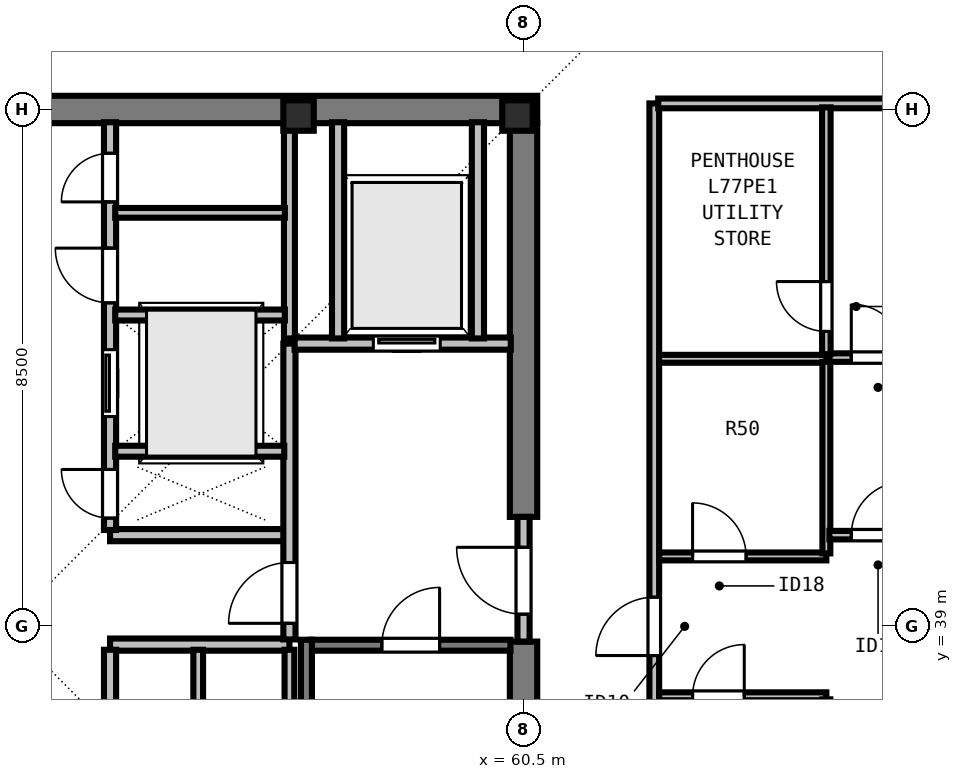
"""IFC4 building model, lengths in metres.
Left out: names, types, materials, properties, quantities, classifications, styles, units other than length and angle.
Written with IfcOpenShell. Run it as: python <this file> out.ifc"""

import sys

from ifc_helpers import new_model, si_unit, direction, frame, frame_2d, origin, origin_2d, place, context, subcontext, project, spatial, rectangle, i_section, extrude, element, fill, save


model = new_model("IFC4")
c1 = context("Model", 3, precision=1e-05, world=origin(), true_north=direction((0.0, 1.0)))
c2 = subcontext(c1, "Body", "Model", "MODEL_VIEW")
j1 = project(units=[si_unit("LENGTHUNIT", "METRE"), si_unit("PLANEANGLEUNIT", "RADIAN")], contexts=[c1])
p1 = place(None, origin())
s1 = spatial("IfcSite", under=j1, at=p1, CompositionType="ELEMENT")
p2 = place(p1, origin())
s2 = spatial("IfcBuilding", under=s1, at=p2, CompositionType="ELEMENT")
p3 = place(p2, frame((0.0, 0.0, 280.5)))
s3 = spatial("IfcBuildingStorey", under=s2, at=p3, CompositionType="ELEMENT", Elevation=280.5)
for number, where, z_axis, x_axis in (
    (1, (56.8, 47.4, 0.0), (0.0, 0.0, 1.0), (1.0, 0.0, 0.0)),
    (2, (60.4, 47.4, 0.0), (0.0, 0.0, 1.0), (1.0, 0.0, 0.0)),
):
    element("IfcColumn", number, at=place(p3, frame(where, z_axis=z_axis, x_axis=x_axis)), inside=s3, PredefinedType="COLUMN", context=c2, shape_type="SweptSolid", body=[
        extrude(i_section(OverallWidth=0.5, OverallDepth=0.5, WebThickness=0.028, FlangeThickness=0.045, at=origin_2d()), origin(), (0.0, 0.0, 1.0), 3.5),
    ])
p4 = place(p3, frame((43.275, 47.5, 0.0), z_axis=(0.0, 0.0, 1.0), x_axis=(1.0, 0.0, 0.0)))
e3 = element("IfcWall", 3, at=p4, inside=s3, PredefinedType="SHEAR", context=c2, shape_type="SweptSolid", body=[
    extrude(rectangle(XDim=17.45, YDim=0.45, at=frame_2d((8.725, 0.0))), origin(), (0.0, 0.0, 1.0), 3.29),
])
p5 = place(p3, frame((60.5, 30.715, 0.0), z_axis=(0.0, 0.0, 1.0), x_axis=(0.0, 1.0, 0.0)))
e4 = element("IfcWall", 4, at=p5, inside=s3, PredefinedType="SHEAR", context=c2, shape_type="SweptSolid", body=[
    extrude(rectangle(XDim=8.035, YDim=0.45, at=frame_2d((4.018, 0.0))), origin(), (0.0, 0.0, 1.0), 3.29),
])
p6 = place(p3, frame((60.5, 40.8, 0.0), z_axis=(0.0, 0.0, 1.0), x_axis=(0.0, 1.0, 0.0)))
e5 = element("IfcWall", 5, at=p6, inside=s3, PredefinedType="SHEAR", context=c2, shape_type="SweptSolid", body=[
    extrude(rectangle(XDim=6.485, YDim=0.45, at=frame_2d((3.242, 0.0))), origin(), (0.0, 0.0, 1.0), 3.29),
])
for number, where, z_axis, x_axis in (
    (6, (53.7, 38.7, 0.0), (0.0, 0.0, 1.0), (1.0, 0.0, 0.0)),
    (7, (53.7, 40.5, 0.0), (0.0, 0.0, 1.0), (1.0, 0.0, 0.0)),
):
    element("IfcWall", number, at=place(p3, frame(where, z_axis=z_axis, x_axis=x_axis)), inside=s3, PredefinedType="SOLIDWALL", context=c2, shape_type="SweptSolid", body=[
        extrude(rectangle(XDim=2.95, YDim=0.2, at=frame_2d((1.475, 0.0))), origin(), (0.0, 0.0, 1.0), 3.29),
    ])
p7 = place(p3, frame((53.7, 30.71, 0.0), z_axis=(0.0, 0.0, 1.0), x_axis=(0.0, 1.0, 0.0)))
e8 = element("IfcWall", 8, at=p7, inside=s3, PredefinedType="SOLIDWALL", context=c2, shape_type="SweptSolid", body=[
    extrude(rectangle(XDim=7.905, YDim=0.2, at=frame_2d((3.953, 0.0))), origin(), (0.0, 0.0, 1.0), 3.29),
])
p8 = place(p7, frame((2.14, 0.0, 0.0)))
e9 = element("IfcOpeningElement", 9, at=p8, cuts=e8, PredefinedType="OPENING", context=c2, shape_type="SweptSolid", body=[
    extrude(rectangle(XDim=0.95, YDim=2.12, at=frame_2d((0.475, 1.06))), frame((0.0, 0.11, 0.0), z_axis=(0.0, -1.0, 0.0), x_axis=(1.0, 0.0, 0.0)), (0.0, 0.0, 1.0), 0.22),
])
p9 = place(p3, frame((53.7, 40.585, 0.0), z_axis=(0.0, 0.0, 1.0), x_axis=(0.0, 1.0, 0.0)))
e10 = element("IfcWall", 10, at=p9, inside=s3, PredefinedType="SOLIDWALL", context=c2, shape_type="SweptSolid", body=[
    extrude(rectangle(XDim=6.705, YDim=0.2, at=frame_2d((3.353, 0.0))), origin(), (0.0, 0.0, 1.0), 3.29),
])
p10 = place(p9, frame((0.195, 0.0, 0.0)))
e11 = element("IfcOpeningElement", 11, at=p10, cuts=e10, PredefinedType="OPENING", context=c2, shape_type="SweptSolid", body=[
    extrude(rectangle(XDim=0.8, YDim=2.08, at=frame_2d((0.4, 1.04))), frame((0.0, 0.11, 0.0), z_axis=(0.0, -1.0, 0.0), x_axis=(1.0, 0.0, 0.0)), (0.0, 0.0, 1.0), 0.22),
])
p11 = place(p9, frame((1.865, 0.0, 0.0)))
e12 = element("IfcOpeningElement", 12, at=p11, cuts=e10, PredefinedType="OPENING", context=c2, shape_type="SweptSolid", body=[
    extrude(rectangle(XDim=1.1, YDim=2.2, at=frame_2d((0.55, 1.1))), frame((0.0, 0.11, 0.0), z_axis=(0.0, -1.0, 0.0), x_axis=(1.0, 0.0, 0.0)), (0.0, 0.0, 1.0), 0.22),
])
p12 = place(p9, frame((3.735, 0.0, 0.0)))
e13 = element("IfcOpeningElement", 13, at=p12, cuts=e10, PredefinedType="OPENING", context=c2, shape_type="SweptSolid", body=[
    extrude(rectangle(XDim=0.9, YDim=2.12, at=frame_2d((0.45, 1.06))), frame((0.0, 0.11, 0.0), z_axis=(0.0, -1.0, 0.0), x_axis=(1.0, 0.0, 0.0)), (0.0, 0.0, 1.0), 0.22),
])
p13 = place(p9, frame((5.395, 0.0, 0.0)))
e14 = element("IfcOpeningElement", 14, at=p13, cuts=e10, PredefinedType="OPENING", context=c2, shape_type="SweptSolid", body=[
    extrude(rectangle(XDim=0.8, YDim=2.1, at=frame_2d((0.4, 1.05))), frame((0.0, 0.11, 0.0), z_axis=(0.0, -1.0, 0.0), x_axis=(1.0, 0.0, 0.0)), (0.0, 0.0, 1.0), 0.22),
])
p14 = place(p3, frame((60.5, 38.75, 0.0), z_axis=(0.0, 0.0, 1.0), x_axis=(0.0, 1.0, 0.0)))
e15 = element("IfcWall", 15, at=p14, inside=s3, PredefinedType="SOLIDWALL", context=c2, shape_type="SweptSolid", body=[
    extrude(rectangle(XDim=2.05, YDim=0.2, at=frame_2d((1.025, 0.0))), origin(), (0.0, 0.0, 1.0), 3.29),
])
p15 = place(p14, frame((0.45, 0.0, 0.0)))
e16 = element("IfcOpeningElement", 16, at=p15, cuts=e15, PredefinedType="OPENING", context=c2, shape_type="SweptSolid", body=[
    extrude(rectangle(XDim=1.1, YDim=2.15, at=frame_2d((0.55, 1.075))), frame((0.0, 0.11, 0.0), z_axis=(0.0, -1.0, 0.0), x_axis=(1.0, 0.0, 0.0)), (0.0, 0.0, 1.0), 0.22),
])
p16 = place(p3, frame((56.65, 38.785, 0.0), z_axis=(0.0, 0.0, 1.0), x_axis=(0.0, 1.0, 0.0)))
e17 = element("IfcWall", 17, at=p16, inside=s3, PredefinedType="SOLIDWALL", context=c2, shape_type="SweptSolid", body=[
    extrude(rectangle(XDim=4.865, YDim=0.2, at=frame_2d((2.433, 0.0))), origin(), (0.0, 0.0, 1.0), 3.29),
])
p17 = place(p16, frame((0.265, 0.0, 0.0)))
e18 = element("IfcOpeningElement", 18, at=p17, cuts=e17, PredefinedType="OPENING", context=c2, shape_type="SweptSolid", body=[
    extrude(rectangle(XDim=1.0, YDim=2.15, at=frame_2d((0.5, 1.075))), frame((0.0, 0.11, 0.0), z_axis=(0.0, -1.0, 0.0), x_axis=(1.0, 0.0, 0.0)), (0.0, 0.0, 1.0), 0.22),
])
p18 = place(p3, frame((56.735, 43.65, 0.0), z_axis=(0.0, 0.0, 1.0), x_axis=(1.0, 0.0, 0.0)))
e19 = element("IfcWall", 19, at=p18, inside=s3, PredefinedType="SOLIDWALL", context=c2, shape_type="SweptSolid", body=[
    extrude(rectangle(XDim=3.555, YDim=0.2, at=frame_2d((1.777, 0.0))), origin(), (0.0, 0.0, 1.0), 3.29),
])
p19 = place(p18, frame((1.295, 0.0, 0.0)))
e20 = element("IfcOpeningElement", 20, at=p19, cuts=e19, PredefinedType="OPENING", context=c2, shape_type="SweptSolid", body=[
    extrude(rectangle(XDim=1.1, YDim=2.2, at=frame_2d((0.55, 1.1))), frame((0.0, 0.11, 0.0), z_axis=(0.0, -1.0, 0.0), x_axis=(1.0, 0.0, 0.0)), (0.0, 0.0, 1.0), 0.22),
])
for number, where, z_axis, x_axis in (
    (21, (57.45, 43.735, 0.0), (0.0, 0.0, 1.0), (0.0, 1.0, 0.0)),
    (22, (59.75, 43.735, 0.0), (0.0, 0.0, 1.0), (0.0, 1.0, 0.0)),
):
    element("IfcWall", number, at=place(p3, frame(where, z_axis=z_axis, x_axis=x_axis)), inside=s3, PredefinedType="SOLIDWALL", context=c2, shape_type="SweptSolid", body=[
        extrude(rectangle(XDim=3.555, YDim=0.2, at=frame_2d((1.777, 0.0))), origin(), (0.0, 0.0, 1.0), 3.29),
    ])
p20 = place(p3, frame((56.65, 30.71, 0.0), z_axis=(0.0, 0.0, 1.0), x_axis=(0.0, 1.0, 0.0)))
e23 = element("IfcWall", 23, at=p20, inside=s3, PredefinedType="PARTITIONING", context=c2, shape_type="SweptSolid", body=[
    extrude(rectangle(XDim=7.905, YDim=0.16, at=frame_2d((3.953, 0.0))), origin(), (0.0, 0.0, 1.0), 3.29),
])
p21 = place(p3, frame((55.15, 30.71, 0.0), z_axis=(0.0, 0.0, 1.0), x_axis=(0.0, 1.0, 0.0)))
e24 = element("IfcWall", 24, at=p21, inside=s3, PredefinedType="PARTITIONING", context=c2, shape_type="SweptSolid", body=[
    extrude(rectangle(XDim=7.905, YDim=0.16, at=frame_2d((3.953, 0.0))), origin(), (0.0, 0.0, 1.0), 3.29),
])
p22 = place(p21, frame((3.54, 0.0, 0.0)))
e25 = element("IfcOpeningElement", 25, at=p22, cuts=e24, PredefinedType="OPENING", context=c2, shape_type="SweptSolid", body=[
    extrude(rectangle(XDim=0.85, YDim=2.12, at=frame_2d((0.425, 1.06))), frame((0.0, 0.09, 0.0), z_axis=(0.0, -1.0, 0.0), x_axis=(1.0, 0.0, 0.0)), (0.0, 0.0, 1.0), 0.18),
])
p23 = place(p3, frame((56.65, 43.735, 0.0), z_axis=(0.0, 0.0, 1.0), x_axis=(0.0, 1.0, 0.0)))
e26 = element("IfcWall", 26, at=p23, inside=s3, PredefinedType="SOLIDWALL", context=c2, shape_type="SweptSolid", body=[
    extrude(rectangle(XDim=3.555, YDim=0.18, at=frame_2d((1.777, 0.0))), origin(), (0.0, 0.0, 1.0), 3.29),
])
p24 = place(p3, frame((53.785, 41.88, 0.0), z_axis=(0.0, 0.0, 1.0), x_axis=(1.0, 0.0, 0.0)))
e27 = element("IfcWall", 27, at=p24, inside=s3, PredefinedType="SOLIDWALL", context=c2, shape_type="SweptSolid", body=[
    extrude(rectangle(XDim=2.78, YDim=0.18, at=frame_2d((1.39, 0.0))), origin(), (0.0, 0.0, 1.0), 3.29),
])
p25 = place(p3, frame((53.785, 44.12, 0.0), z_axis=(0.0, 0.0, 1.0), x_axis=(1.0, 0.0, 0.0)))
e28 = element("IfcWall", 28, at=p25, inside=s3, PredefinedType="SOLIDWALL", context=c2, shape_type="SweptSolid", body=[
    extrude(rectangle(XDim=2.79, YDim=0.18, at=frame_2d((1.395, 0.0))), origin(), (0.0, 0.0, 1.0), 3.29),
])
p26 = place(p3, frame((53.785, 45.8, 0.0), z_axis=(0.0, 0.0, 1.0), x_axis=(1.0, 0.0, 0.0)))
e29 = element("IfcWall", 29, at=p26, inside=s3, PredefinedType="PARTITIONING", context=c2, shape_type="SweptSolid", body=[
    extrude(rectangle(XDim=2.79, YDim=0.16, at=frame_2d((1.395, 0.0))), origin(), (0.0, 0.0, 1.0), 3.29),
])
p27 = place(p3, frame((62.65, 30.4, 0.0), z_axis=(0.0, 0.0, 1.0), x_axis=(0.0, 1.0, 0.0)))
e30 = element("IfcWall", 30, at=p27, inside=s3, PredefinedType="PARTITIONING", context=c2, shape_type="SweptSolid", body=[
    extrude(rectangle(XDim=17.2, YDim=0.16, at=frame_2d((8.6, 0.0))), origin(), (0.0, 0.0, 1.0), 3.29),
])
p28 = place(p27, frame((8.12, 0.0, 0.0)))
e31 = element("IfcOpeningElement", 31, at=p28, cuts=e30, PredefinedType="OPENING", context=c2, shape_type="SweptSolid", body=[
    extrude(rectangle(XDim=0.96, YDim=2.18, at=frame_2d((0.48, 1.09))), frame((0.0, 0.09, 0.0), z_axis=(0.0, -1.0, 0.0), x_axis=(1.0, 0.0, 0.0)), (0.0, 0.0, 1.0), 0.18),
])
p29 = place(p3, frame((62.715, 47.6, 0.0), z_axis=(0.0, 0.0, 1.0), x_axis=(1.0, 0.0, 0.0)))
e32 = element("IfcWall", 32, at=p29, inside=s3, PredefinedType="PARTITIONING", context=c2, shape_type="SweptSolid", body=[
    extrude(rectangle(XDim=10.0, YDim=0.16, at=frame_2d((5.0, 0.0))), origin(), (0.0, 0.0, 1.0), 3.29),
])
p30 = place(p3, frame((62.73, 37.85, 0.0), z_axis=(0.0, 0.0, 1.0), x_axis=(1.0, 0.0, 0.0)))
e33 = element("IfcWall", 33, at=p30, inside=s3, PredefinedType="PLUMBINGWALL", context=c2, shape_type="SweptSolid", body=[
    extrude(rectangle(XDim=2.75, YDim=0.13, at=frame_2d((1.375, 0.0))), origin(), (0.0, 0.0, 1.0), 3.29),
])
p31 = place(p30, frame((0.55, 0.0, 0.0)))
e34 = element("IfcOpeningElement", 34, at=p31, cuts=e33, PredefinedType="OPENING", context=c2, shape_type="SweptSolid", body=[
    extrude(rectangle(XDim=0.85, YDim=2.08, at=frame_2d((0.425, 1.04))), frame((0.0, 0.075, 0.0), z_axis=(0.0, -1.0, 0.0), x_axis=(1.0, 0.0, 0.0)), (0.0, 0.0, 1.0), 0.15),
])
p32 = place(p3, frame((62.73, 43.4, 0.0), z_axis=(0.0, 0.0, 1.0), x_axis=(1.0, 0.0, 0.0)))
e35 = element("IfcWall", 35, at=p32, inside=s3, PredefinedType="PLUMBINGWALL", context=c2, shape_type="SweptSolid", body=[
    extrude(rectangle(XDim=2.75, YDim=0.13, at=frame_2d((1.375, 0.0))), origin(), (0.0, 0.0, 1.0), 3.29),
])
p33 = place(p3, frame((62.73, 40.15, 0.0), z_axis=(0.0, 0.0, 1.0), x_axis=(1.0, 0.0, 0.0)))
e36 = element("IfcWall", 36, at=p33, inside=s3, PredefinedType="PLUMBINGWALL", context=c2, shape_type="SweptSolid", body=[
    extrude(rectangle(XDim=2.75, YDim=0.13, at=frame_2d((1.375, 0.0))), origin(), (0.0, 0.0, 1.0), 3.29),
])
p34 = place(p33, frame((0.55, 0.0, 0.0)))
e37 = element("IfcOpeningElement", 37, at=p34, cuts=e36, PredefinedType="OPENING", context=c2, shape_type="SweptSolid", body=[
    extrude(rectangle(XDim=0.88, YDim=2.1, at=frame_2d((0.44, 1.05))), frame((0.0, 0.075, 0.0), z_axis=(0.0, -1.0, 0.0), x_axis=(1.0, 0.0, 0.0)), (0.0, 0.0, 1.0), 0.15),
])
p35 = place(p3, frame((65.48, 40.2, 0.0), z_axis=(0.0, 0.0, 1.0), x_axis=(0.0, 1.0, 0.0)))
e38 = element("IfcWall", 38, at=p35, inside=s3, PredefinedType="PLUMBINGWALL", context=c2, shape_type="SweptSolid", body=[
    extrude(rectangle(XDim=3.15, YDim=0.13, at=frame_2d((1.575, 0.0))), origin(), (0.0, 0.0, 1.0), 3.29),
])
p36 = place(p3, frame((65.53, 43.42, 0.0), z_axis=(0.0, 0.0, 1.0), x_axis=(1.0, 0.0, 0.0)))
e39 = element("IfcWall", 39, at=p36, inside=s3, PredefinedType="PARTITIONING", context=c2, shape_type="SweptSolid", body=[
    extrude(rectangle(XDim=7.09, YDim=0.14, at=frame_2d((3.545, 0.0))), origin(), (0.0, 0.0, 1.0), 3.29),
])
p37 = place(p36, frame((0.36, 0.0, 0.0)))
e40 = element("IfcOpeningElement", 40, at=p37, cuts=e39, PredefinedType="OPENING", context=c2, shape_type="SweptSolid", body=[
    extrude(rectangle(XDim=0.88, YDim=2.1, at=frame_2d((0.44, 1.05))), frame((0.0, 0.08, 0.0), z_axis=(0.0, -1.0, 0.0), x_axis=(1.0, 0.0, 0.0)), (0.0, 0.0, 1.0), 0.16),
])
p38 = place(p3, frame((65.48, 43.475, 0.0), z_axis=(0.0, 0.0, 1.0), x_axis=(0.0, 1.0, 0.0)))
e41 = element("IfcWall", 41, at=p38, inside=s3, PredefinedType="PARTITIONING", context=c2, shape_type="SweptSolid", body=[
    extrude(rectangle(XDim=4.06, YDim=0.14, at=frame_2d((2.03, 0.0))), origin(), (0.0, 0.0, 1.0), 3.29),
])
p39 = place(p38, frame((0.375, 0.0, 0.0)))
e42 = element("IfcOpeningElement", 42, at=p39, cuts=e41, PredefinedType="OPENING", context=c2, shape_type="SweptSolid", body=[
    extrude(rectangle(XDim=0.82, YDim=2.1, at=frame_2d((0.41, 1.05))), frame((0.0, 0.08, 0.0), z_axis=(0.0, -1.0, 0.0), x_axis=(1.0, 0.0, 0.0)), (0.0, 0.0, 1.0), 0.16),
])
p40 = place(p3, frame((65.53, 40.5, 0.0), z_axis=(0.0, 0.0, 1.0), x_axis=(1.0, 0.0, 0.0)))
e43 = element("IfcWall", 43, at=p40, inside=s3, PredefinedType="PARTITIONING", context=c2, shape_type="SweptSolid", body=[
    extrude(rectangle(XDim=7.09, YDim=0.14, at=frame_2d((3.545, 0.0))), origin(), (0.0, 0.0, 1.0), 3.29),
])
p41 = place(p40, frame((0.36, 0.0, 0.0)))
e44 = element("IfcOpeningElement", 44, at=p41, cuts=e43, PredefinedType="OPENING", context=c2, shape_type="SweptSolid", body=[
    extrude(rectangle(XDim=0.88, YDim=2.1, at=frame_2d((0.44, 1.05))), frame((0.0, 0.08, 0.0), z_axis=(0.0, -1.0, 0.0), x_axis=(1.0, 0.0, 0.0)), (0.0, 0.0, 1.0), 0.16),
])
p42 = place(p3, frame((57.005, 38.69, 0.0), z_axis=(0.0, 0.0, 1.0), x_axis=(1.0, 0.0, 0.0)))
e45 = element("IfcWall", 45, at=p42, inside=s3, PredefinedType="SOLIDWALL", context=c2, shape_type="SweptSolid", body=[
    extrude(rectangle(XDim=3.28, YDim=0.18, at=frame_2d((1.64, 0.0))), origin(), (0.0, 0.0, 1.0), 3.29),
])
p43 = place(p42, frame((1.165, 0.0, 0.0)))
e46 = element("IfcOpeningElement", 46, at=p43, cuts=e45, PredefinedType="OPENING", context=c2, shape_type="SweptSolid", body=[
    extrude(rectangle(XDim=0.95, YDim=2.15, at=frame_2d((0.475, 1.075))), frame((0.0, 0.1, 0.0), z_axis=(0.0, -1.0, 0.0), x_axis=(1.0, 0.0, 0.0)), (0.0, 0.0, 1.0), 0.2),
])
p44 = place(p3, frame((56.93, 38.78, 0.0), z_axis=(0.0, 0.0, 1.0), x_axis=(0.0, -1.0, 0.0)))
e47 = element("IfcWall", 47, at=p44, inside=s3, PredefinedType="SOLIDWALL", context=c2, shape_type="SweptSolid", body=[
    extrude(rectangle(XDim=8.067, YDim=0.18, at=frame_2d((4.034, 0.0))), origin(), (0.0, 0.0, 1.0), 3.29),
])
p45 = place(p15, origin())
e48 = element("IfcDoor", 48, at=p45, inside=s3, OperationType="SINGLE_SWING_RIGHT", PredefinedType="DOOR", context=c2, shape_type="SweptSolid", body=[
    extrude(rectangle(XDim=1.1, YDim=2.15, at=frame_2d((0.55, 1.075))), frame((0.0, 0.025, 0.0), z_axis=(0.0, -1.0, 0.0), x_axis=(1.0, 0.0, 0.0)), (0.0, 0.0, 1.0), 0.05),
])
fill(e16, e48)
p46 = place(p17, origin())
e49 = element("IfcDoor", 49, at=p46, inside=s3, OperationType="SINGLE_SWING_LEFT", PredefinedType="DOOR", context=c2, shape_type="SweptSolid", body=[
    extrude(rectangle(XDim=1.0, YDim=2.15, at=frame_2d((0.5, 1.075))), frame((0.0, 0.025, 0.0), z_axis=(0.0, -1.0, 0.0), x_axis=(1.0, 0.0, 0.0)), (0.0, 0.0, 1.0), 0.05),
])
fill(e18, e49)
p47 = place(p19, origin())
e50 = element("IfcDoor", 50, at=p47, inside=s3, OperationType="SLIDING_TO_LEFT", PredefinedType="DOOR", context=c2, shape_type="SweptSolid", body=[
    extrude(rectangle(XDim=1.1, YDim=2.2, at=frame_2d((0.55, 1.1))), frame((0.0, 0.025, 0.0), z_axis=(0.0, -1.0, 0.0), x_axis=(1.0, 0.0, 0.0)), (0.0, 0.0, 1.0), 0.05),
])
fill(e20, e50)
p48 = place(p10, origin())
e51 = element("IfcDoor", 51, at=p48, inside=s3, OperationType="SINGLE_SWING_RIGHT", PredefinedType="DOOR", context=c2, shape_type="SweptSolid", body=[
    extrude(rectangle(XDim=0.8, YDim=2.08, at=frame_2d((0.4, 1.04))), frame((0.0, 0.025, 0.0), z_axis=(0.0, -1.0, 0.0), x_axis=(1.0, 0.0, 0.0)), (0.0, 0.0, 1.0), 0.05),
])
fill(e11, e51)
p49 = place(p11, origin())
e52 = element("IfcDoor", 52, at=p49, inside=s3, OperationType="SLIDING_TO_LEFT", PredefinedType="DOOR", context=c2, shape_type="SweptSolid", body=[
    extrude(rectangle(XDim=1.1, YDim=2.2, at=frame_2d((0.55, 1.1))), frame((0.0, 0.025, 0.0), z_axis=(0.0, -1.0, 0.0), x_axis=(1.0, 0.0, 0.0)), (0.0, 0.0, 1.0), 0.05),
])
fill(e12, e52)
p50 = place(p12, origin())
e53 = element("IfcDoor", 53, at=p50, inside=s3, OperationType="SINGLE_SWING_RIGHT", PredefinedType="DOOR", context=c2, shape_type="SweptSolid", body=[
    extrude(rectangle(XDim=0.9, YDim=2.12, at=frame_2d((0.45, 1.06))), frame((0.0, 0.025, 0.0), z_axis=(0.0, -1.0, 0.0), x_axis=(1.0, 0.0, 0.0)), (0.0, 0.0, 1.0), 0.05),
])
fill(e13, e53)
p51 = place(p13, origin())
e54 = element("IfcDoor", 54, at=p51, inside=s3, OperationType="SINGLE_SWING_LEFT", PredefinedType="DOOR", context=c2, shape_type="SweptSolid", body=[
    extrude(rectangle(XDim=0.8, YDim=2.1, at=frame_2d((0.4, 1.05))), frame((0.0, 0.025, 0.0), z_axis=(0.0, -1.0, 0.0), x_axis=(1.0, 0.0, 0.0)), (0.0, 0.0, 1.0), 0.05),
])
fill(e14, e54)
p52 = place(p31, origin())
e55 = element("IfcDoor", 55, at=p52, inside=s3, OperationType="SINGLE_SWING_RIGHT", PredefinedType="DOOR", context=c2, shape_type="SweptSolid", body=[
    extrude(rectangle(XDim=0.85, YDim=2.08, at=frame_2d((0.425, 1.04))), frame((0.0, 0.025, 0.0), z_axis=(0.0, -1.0, 0.0), x_axis=(1.0, 0.0, 0.0)), (0.0, 0.0, 1.0), 0.05),
])
fill(e34, e55)
p53 = place(p34, origin())
e56 = element("IfcDoor", 56, at=p53, inside=s3, OperationType="SINGLE_SWING_LEFT", PredefinedType="DOOR", context=c2, shape_type="SweptSolid", body=[
    extrude(rectangle(XDim=0.88, YDim=2.1, at=frame_2d((0.44, 1.05))), frame((0.0, 0.025, 0.0), z_axis=(0.0, -1.0, 0.0), x_axis=(1.0, 0.0, 0.0)), (0.0, 0.0, 1.0), 0.05),
])
fill(e37, e56)
p54 = place(p39, origin())
e57 = element("IfcDoor", 57, at=p54, inside=s3, OperationType="SINGLE_SWING_RIGHT", PredefinedType="DOOR", context=c2, shape_type="SweptSolid", body=[
    extrude(rectangle(XDim=0.82, YDim=2.1, at=frame_2d((0.41, 1.05))), frame((0.0, 0.025, 0.0), z_axis=(0.0, -1.0, 0.0), x_axis=(1.0, 0.0, 0.0)), (0.0, 0.0, 1.0), 0.05),
])
fill(e42, e57)
p55 = place(p37, origin())
e58 = element("IfcDoor", 58, at=p55, inside=s3, OperationType="SINGLE_SWING_LEFT", PredefinedType="DOOR", context=c2, shape_type="SweptSolid", body=[
    extrude(rectangle(XDim=0.88, YDim=2.1, at=frame_2d((0.44, 1.05))), frame((0.0, 0.025, 0.0), z_axis=(0.0, -1.0, 0.0), x_axis=(1.0, 0.0, 0.0)), (0.0, 0.0, 1.0), 0.05),
])
fill(e40, e58)
p56 = place(p41, origin())
e59 = element("IfcDoor", 59, at=p56, inside=s3, OperationType="SINGLE_SWING_RIGHT", PredefinedType="DOOR", context=c2, shape_type="SweptSolid", body=[
    extrude(rectangle(XDim=0.88, YDim=2.1, at=frame_2d((0.44, 1.05))), frame((0.0, 0.025, 0.0), z_axis=(0.0, -1.0, 0.0), x_axis=(1.0, 0.0, 0.0)), (0.0, 0.0, 1.0), 0.05),
])
fill(e44, e59)
p57 = place(p28, origin())
e60 = element("IfcDoor", 60, at=p57, inside=s3, OperationType="SINGLE_SWING_LEFT", PredefinedType="DOOR", context=c2, shape_type="SweptSolid", body=[
    extrude(rectangle(XDim=0.96, YDim=2.18, at=frame_2d((0.48, 1.09))), frame((0.0, 0.025, 0.0), z_axis=(0.0, -1.0, 0.0), x_axis=(1.0, 0.0, 0.0)), (0.0, 0.0, 1.0), 0.05),
])
fill(e31, e60)
p58 = place(p43, origin())
e61 = element("IfcDoor", 61, at=p58, inside=s3, OperationType="SINGLE_SWING_RIGHT", PredefinedType="DOOR", context=c2, shape_type="SweptSolid", body=[
    extrude(rectangle(XDim=0.95, YDim=2.15, at=frame_2d((0.475, 1.075))), frame((0.0, 0.025, 0.0), z_axis=(0.0, -1.0, 0.0), x_axis=(1.0, 0.0, 0.0)), (0.0, 0.0, 1.0), 0.05),
])
fill(e46, e61)
save(model, sys.argv[1])
